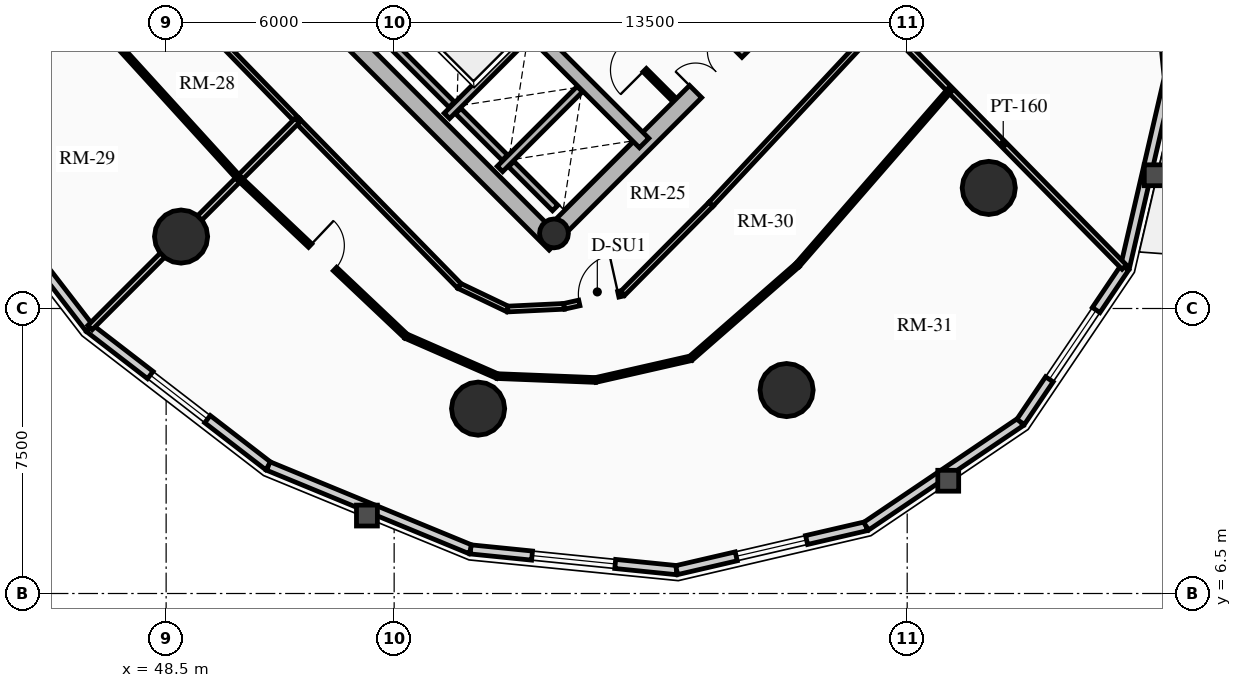
"""IFC4 building model, lengths in metres.
Left out: names, types, materials, properties, quantities, classifications, styles, units other than length and angle.
Written with IfcOpenShell. Run it as: python <this file> out.ifc"""

import sys

from ifc_helpers import new_model, si_unit, direction, frame, frame_2d, origin, origin_2d, place, context, subcontext, project, spatial, rectangle, circle, hollow_circle, extrude, source, transform, mapped, element, fill, save


model = new_model("IFC4")
c1 = context("Model", 3, precision=1e-05, world=origin(), true_north=direction((0.0, 1.0)))
c2 = subcontext(c1, "Body", "Model", "MODEL_VIEW")
j1 = project(units=[si_unit("LENGTHUNIT", "METRE"), si_unit("PLANEANGLEUNIT", "RADIAN")], contexts=[c1])
p1 = place(None, origin())
s1 = spatial("IfcSite", under=j1, at=p1, CompositionType="ELEMENT")
p2 = place(p1, origin())
s2 = spatial("IfcBuilding", under=s1, at=p2, CompositionType="ELEMENT")
p3 = place(p2, frame((0.0, 0.0, 87.61)))
s3 = spatial("IfcBuildingStorey", under=s2, at=p3, CompositionType="ELEMENT", Elevation=87.61)
p4 = place(p3, frame((58.737, 15.697, 0.0), z_axis=(0.0, 0.0, 1.0), x_axis=(-0.707106781187, 0.707106781187, 0.0)))
e1 = element("IfcWall", 1, at=p4, inside=s3, PredefinedType="SHEAR", context=c2, shape_type="SweptSolid", body=[
    extrude(rectangle(XDim=14.2, YDim=0.45, at=frame_2d((7.1, 0.0))), origin(), (0.0, 0.0, 1.0), 2.91),
])
p5 = place(p3, frame((58.578, 15.856, 0.0), z_axis=(0.0, 0.0, 1.0), x_axis=(0.707106781187, 0.707106781187, 0.0)))
e2 = element("IfcWall", 2, at=p5, inside=s3, PredefinedType="SHEAR", context=c2, shape_type="SweptSolid", body=[
    extrude(rectangle(XDim=10.7, YDim=0.45, at=frame_2d((5.35, 0.0))), origin(), (0.0, 0.0, 1.0), 2.91),
])
m1 = source(origin(), c2, "Body", "SweptSolid", [
    extrude(rectangle(XDim=1.5, YDim=2.02, at=frame_2d((0.75, 1.01))), frame((0.0, 0.235, 0.0), z_axis=(0.0, -1.0, 0.0), x_axis=(1.0, 0.0, 0.0)), (0.0, 0.0, 1.0), 0.47),
])
p6 = place(p5, frame((5.45, 0.0, 0.0)))
e3 = element("IfcOpeningElement", 3, at=p6, cuts=e2, PredefinedType="OPENING", context=c2, shape_type="MappedRepresentation", body=[
    mapped(m1, transform((0.0, 0.0, 0.0), x_axis=(1.0, 0.0, 0.0), y_axis=(0.0, 1.0, 0.0), z_axis=(0.0, 0.0, 1.0), scale=1.0)),
])
p7 = place(p3, frame((61.078, 18.355, 0.0), z_axis=(0.0, 0.0, 1.0), x_axis=(-0.707106781187, 0.707106781187, 0.0)))
e4 = element("IfcWall", 4, at=p7, inside=s3, PredefinedType="SHEAR", context=c2, shape_type="SweptSolid", body=[
    extrude(rectangle(XDim=13.75, YDim=0.35, at=frame_2d((6.875, 0.0))), origin(), (0.0, 0.0, 1.0), 2.91),
])
m2 = source(origin(), c2, "Body", "SweptSolid", [
    extrude(rectangle(XDim=1.1, YDim=2.015, at=frame_2d((0.55, 1.007))), frame((0.0, 0.185, 0.0), z_axis=(0.0, -1.0, 0.0), x_axis=(1.0, 0.0, 0.0)), (0.0, 0.0, 1.0), 0.37),
])
p8 = place(p7, frame((4.875, 0.0, 0.0)))
e5 = element("IfcOpeningElement", 5, at=p8, cuts=e4, PredefinedType="OPENING", context=c2, shape_type="MappedRepresentation", body=[
    mapped(m2, transform((0.0, 0.0, 0.0), x_axis=(1.0, 0.0, 0.0), y_axis=(0.0, 1.0, 0.0), z_axis=(0.0, 0.0, 1.0), scale=1.0)),
])
m3 = source(origin(), c2, "Body", "SweptSolid", [
    extrude(rectangle(XDim=1.15, YDim=2.02, at=frame_2d((0.575, 1.01))), frame((0.0, 0.185, 0.0), z_axis=(0.0, -1.0, 0.0), x_axis=(1.0, 0.0, 0.0)), (0.0, 0.0, 1.0), 0.37),
])
p9 = place(p7, frame((7.295, 0.0, 0.0)))
e6 = element("IfcOpeningElement", 6, at=p9, cuts=e4, PredefinedType="OPENING", context=c2, shape_type="MappedRepresentation", body=[
    mapped(m3, transform((0.0, 0.0, 0.0), x_axis=(1.0, 0.0, 0.0), y_axis=(0.0, 1.0, 0.0), z_axis=(0.0, 0.0, 1.0), scale=1.0)),
])
p10 = place(p3, frame((58.706, 15.976, 0.0), z_axis=(0.0, 0.0, 1.0), x_axis=(0.707106781187, 0.707106781187, 0.0)))
e7 = element("IfcColumn", 7, at=p10, inside=s3, PredefinedType="COLUMN", context=c2, shape_type="SweptSolid", body=[
    extrude(hollow_circle(Radius=0.38, WallThickness=0.032, at=origin_2d()), origin(), (0.0, 0.0, 1.0), 2.91),
])
for number, where, z_axis, x_axis in (
    (8, (48.893, 15.893, 0.0), (0.0, 0.0, 1.0), (1.0, 0.0, 0.0)),
    (9, (56.709, 11.365, 0.0), (0.0, 0.0, 1.0), (1.0, 0.0, 0.0)),
    (10, (64.827, 11.854, 0.0), (0.0, 0.0, 1.0), (1.0, 0.0, 0.0)),
    (11, (70.146, 17.173, 0.0), (0.0, 0.0, 1.0), (1.0, 0.0, 0.0)),
):
    element("IfcColumn", number, at=place(p3, frame(where, z_axis=z_axis, x_axis=x_axis)), inside=s3, PredefinedType="USERDEFINED", context=c2, shape_type="SweptSolid", body=[
        extrude(circle(Radius=0.7, at=origin_2d()), origin(), (0.0, 0.0, 1.0), 2.91),
    ])
p11 = place(p3, frame((46.483, 13.483, 0.0), z_axis=(0.0, 0.0, 1.0), x_axis=(-0.61054437102, 0.791982052206, 0.0)))
e12 = element("IfcWall", 12, at=p11, inside=s3, PredefinedType="SOLIDWALL", context=c2, shape_type="SweptSolid", body=[
    extrude(rectangle(XDim=5.942, YDim=0.24, at=frame_2d((2.971, 0.0))), origin(), (0.0, 0.0, 1.0), 2.179),
])
p12 = place(p3, frame((51.189, 9.855, 0.0), z_axis=(0.0, 0.0, 1.0), x_axis=(-0.791982052206, 0.61054437102, 0.0)))
e13 = element("IfcWall", 13, at=p12, inside=s3, PredefinedType="SOLIDWALL", context=c2, shape_type="SweptSolid", body=[
    extrude(rectangle(XDim=5.942, YDim=0.24, at=frame_2d((2.971, 0.0))), origin(), (0.0, 0.0, 1.0), 2.179),
])
m4 = source(origin(), c2, "Body", "SweptSolid", [
    extrude(rectangle(XDim=1.9, YDim=1.35, at=frame_2d((0.95, 0.675))), frame((0.0, 0.13, 0.0), z_axis=(0.0, -1.0, 0.0), x_axis=(1.0, 0.0, 0.0)), (0.0, 0.0, 1.0), 0.26),
])
p13 = place(p12, frame((2.021, 0.0, 0.65)))
e14 = element("IfcOpeningElement", 14, at=p13, cuts=e13, PredefinedType="OPENING", context=c2, shape_type="MappedRepresentation", body=[
    mapped(m4, transform((0.0, 0.0, 0.0), x_axis=(1.0, 0.0, 0.0), y_axis=(0.0, 1.0, 0.0), z_axis=(0.0, 0.0, 1.0), scale=1.0)),
])
p14 = place(p3, frame((56.513, 7.661, 0.0), z_axis=(0.0, 0.0, 1.0), x_axis=(-0.924563909604, 0.381027003055, 0.0)))
e15 = element("IfcWall", 15, at=p14, inside=s3, PredefinedType="SOLIDWALL", context=c2, shape_type="SweptSolid", body=[
    extrude(rectangle(XDim=5.758, YDim=0.24, at=frame_2d((2.879, 0.0))), origin(), (0.0, 0.0, 1.0), 2.179),
])
p15 = place(p3, frame((61.933, 7.115, 0.0), z_axis=(0.0, 0.0, 1.0), x_axis=(-0.994971754311, 0.10015591906, 0.0)))
e16 = element("IfcWall", 16, at=p15, inside=s3, PredefinedType="SOLIDWALL", context=c2, shape_type="SweptSolid", body=[
    extrude(rectangle(XDim=5.448, YDim=0.24, at=frame_2d((2.724, 0.0))), origin(), (0.0, 0.0, 1.0), 2.179),
])
m5 = source(origin(), c2, "Body", "SweptSolid", [
    extrude(rectangle(XDim=2.2, YDim=1.35, at=frame_2d((1.1, 0.675))), frame((0.0, 0.13, 0.0), z_axis=(0.0, -1.0, 0.0), x_axis=(1.0, 0.0, 0.0)), (0.0, 0.0, 1.0), 0.26),
])
p16 = place(p15, frame((1.624, 0.0, 0.65)))
e17 = element("IfcOpeningElement", 17, at=p16, cuts=e16, PredefinedType="OPENING", context=c2, shape_type="MappedRepresentation", body=[
    mapped(m5, transform((0.0, 0.0, 0.0), x_axis=(1.0, 0.0, 0.0), y_axis=(0.0, 1.0, 0.0), z_axis=(0.0, 0.0, 1.0), scale=1.0)),
])
p17 = place(p3, frame((66.92, 8.271, 0.0), z_axis=(0.0, 0.0, 1.0), x_axis=(-0.974165631126, -0.225834725257, 0.0)))
e18 = element("IfcWall", 18, at=p17, inside=s3, PredefinedType="SOLIDWALL", context=c2, shape_type="SweptSolid", body=[
    extrude(rectangle(XDim=5.119, YDim=0.24, at=frame_2d((2.56, 0.0))), origin(), (0.0, 0.0, 1.0), 2.179),
])
p18 = place(p17, frame((1.609, 0.0, 0.65)))
e19 = element("IfcOpeningElement", 19, at=p18, cuts=e18, PredefinedType="OPENING", context=c2, shape_type="MappedRepresentation", body=[
    mapped(m4, transform((0.0, 0.0, 0.0), x_axis=(1.0, 0.0, 0.0), y_axis=(0.0, 1.0, 0.0), z_axis=(0.0, 0.0, 1.0), scale=1.0)),
])
p19 = place(p3, frame((70.985, 11.015, 0.0), z_axis=(0.0, 0.0, 1.0), x_axis=(-0.828781148131, -0.559572880421, 0.0)))
e20 = element("IfcWall", 20, at=p19, inside=s3, PredefinedType="SOLIDWALL", context=c2, shape_type="SweptSolid", body=[
    extrude(rectangle(XDim=4.905, YDim=0.24, at=frame_2d((2.452, 0.0))), origin(), (0.0, 0.0, 1.0), 2.179),
])
p20 = place(p3, frame((73.729, 15.08, 0.0), z_axis=(0.0, 0.0, 1.0), x_axis=(-0.559572880421, -0.828781148131, 0.0)))
e21 = element("IfcWall", 21, at=p20, inside=s3, PredefinedType="SOLIDWALL", context=c2, shape_type="SweptSolid", body=[
    extrude(rectangle(XDim=4.905, YDim=0.24, at=frame_2d((2.452, 0.0))), origin(), (0.0, 0.0, 1.0), 2.179),
])
p21 = place(p20, frame((1.352, 0.0, 0.65)))
e22 = element("IfcOpeningElement", 22, at=p21, cuts=e21, PredefinedType="OPENING", context=c2, shape_type="MappedRepresentation", body=[
    mapped(m5, transform((0.0, 0.0, 0.0), x_axis=(1.0, 0.0, 0.0), y_axis=(0.0, 1.0, 0.0), z_axis=(0.0, 0.0, 1.0), scale=1.0)),
])
p22 = place(p3, frame((74.885, 20.067, 0.0), z_axis=(0.0, 0.0, 1.0), x_axis=(-0.225834725257, -0.974165631126, 0.0)))
e23 = element("IfcWall", 23, at=p22, inside=s3, PredefinedType="SOLIDWALL", context=c2, shape_type="SweptSolid", body=[
    extrude(rectangle(XDim=5.119, YDim=0.24, at=frame_2d((2.56, 0.0))), origin(), (0.0, 0.0, 1.0), 2.179),
])
p23 = place(p3, frame((74.339, 25.487, 0.0), z_axis=(0.0, 0.0, 1.0), x_axis=(0.10015591906, -0.994971754311, 0.0)))
e24 = element("IfcWall", 24, at=p23, inside=s3, PredefinedType="SOLIDWALL", context=c2, shape_type="SweptSolid", body=[
    extrude(rectangle(XDim=5.448, YDim=0.24, at=frame_2d((2.724, 0.0))), origin(), (0.0, 0.0, 1.0), 2.179),
])
p24 = place(p23, frame((1.774, 0.0, 0.65)))
e25 = element("IfcOpeningElement", 25, at=p24, cuts=e24, PredefinedType="OPENING", context=c2, shape_type="MappedRepresentation", body=[
    mapped(m4, transform((0.0, 0.0, 0.0), x_axis=(1.0, 0.0, 0.0), y_axis=(0.0, 1.0, 0.0), z_axis=(0.0, 0.0, 1.0), scale=1.0)),
])
p25 = place(p3, frame((55.888, 19.069, 0.0), z_axis=(0.0, 0.0, 1.0), x_axis=(0.707106781187, 0.707106781187, 0.0)))
e26 = element("IfcWall", 26, at=p25, inside=s3, PredefinedType="SHEAR", context=c2, shape_type="SweptSolid", body=[
    extrude(rectangle(XDim=2.97, YDim=0.2, at=frame_2d((1.485, 0.0))), origin(), (0.0, 0.0, 1.0), 2.91),
])
p26 = place(p3, frame((56.015, 19.366, 0.0), z_axis=(0.0, 0.0, 1.0), x_axis=(-0.707106781187, 0.707106781187, 0.0)))
e27 = element("IfcWall", 27, at=p26, inside=s3, PredefinedType="SHEAR", context=c2, shape_type="SweptSolid", body=[
    extrude(rectangle(XDim=2.44, YDim=0.2, at=frame_2d((1.22, 0.0))), origin(), (0.0, 0.0, 1.0), 2.91),
])
p27 = place(p3, frame((57.284, 17.673, 0.0), z_axis=(0.0, 0.0, 1.0), x_axis=(0.707147878904, 0.70706568108, 0.0)))
e28 = element("IfcWall", 28, at=p27, inside=s3, PredefinedType="SHEAR", context=c2, shape_type="SweptSolid", body=[
    extrude(rectangle(XDim=2.97, YDim=0.2, at=frame_2d((1.485, 0.0))), origin(), (0.0, 0.0, 1.0), 2.91),
])
p28 = place(p3, frame((57.412, 17.97, 0.0), z_axis=(0.0, 0.0, 1.0), x_axis=(-0.707106781187, 0.707106781187, 0.0)))
e29 = element("IfcWall", 29, at=p28, inside=s3, PredefinedType="SHEAR", context=c2, shape_type="SweptSolid", body=[
    extrude(rectangle(XDim=1.735, YDim=0.2, at=frame_2d((0.867, 0.0))), origin(), (0.0, 0.0, 1.0), 2.91),
])
p29 = place(p3, frame((58.737, 16.644, 0.0), z_axis=(0.0, 0.0, 1.0), x_axis=(-0.707032117043, 0.707181437447, 0.0)))
e30 = element("IfcWall", 30, at=p29, inside=s3, PredefinedType="SHEAR", context=c2, shape_type="SweptSolid", body=[
    extrude(rectangle(XDim=1.635, YDim=0.2, at=frame_2d((0.817, 0.0))), origin(), (0.0, 0.0, 1.0), 2.91),
])
p30 = place(p3, frame((61.835, 19.529, 0.0), z_axis=(0.0, 0.0, 1.0), x_axis=(-0.707146413884, 0.707067146267, 0.0)))
e31 = element("IfcWall", 31, at=p30, inside=s3, PredefinedType="PARTITIONING", context=c2, shape_type="SweptSolid", body=[
    extrude(rectangle(XDim=3.08, YDim=0.125, at=frame_2d((1.54, 0.0))), origin(), (0.0, 0.0, 1.0), 2.655),
])
m6 = source(origin(), c2, "Body", "SweptSolid", [
    extrude(rectangle(XDim=0.9, YDim=2.005, at=frame_2d((0.45, 1.002))), frame((0.0, 0.073, 0.0), z_axis=(0.0, -1.0, 0.0), x_axis=(1.0, 0.0, 0.0)), (0.0, 0.0, 1.0), 0.145),
])
p31 = place(p30, frame((1.05, 0.0, 0.0)))
e32 = element("IfcOpeningElement", 32, at=p31, cuts=e31, PredefinedType="OPENING", context=c2, shape_type="MappedRepresentation", body=[
    mapped(m6, transform((0.0, 0.0, 0.0), x_axis=(1.0, 0.0, 0.0), y_axis=(0.0, 1.0, 0.0), z_axis=(0.0, 0.0, 1.0), scale=1.0)),
])
p32 = place(p3, frame((47.786, 23.242, 0.0), z_axis=(0.0, 0.0, 1.0), x_axis=(0.696183456981, -0.717863910659, 0.0)))
e33 = element("IfcWall", 33, at=p32, inside=s3, PredefinedType="PARTITIONING", context=c2, shape_type="SweptSolid", body=[
    extrude(rectangle(XDim=5.979, YDim=0.15, at=frame_2d((2.99, 0.0))), origin(), (0.0, 0.0, 1.0), 2.655),
])
p33 = place(p3, frame((51.949, 18.949, 0.0), z_axis=(0.0, 0.0, 1.0), x_axis=(0.699801520154, -0.714337337951, 0.0)))
e34 = element("IfcWall", 34, at=p33, inside=s3, PredefinedType="PARTITIONING", context=c2, shape_type="SweptSolid", body=[
    extrude(rectangle(XDim=6.097, YDim=0.15, at=frame_2d((3.048, 0.0))), origin(), (0.0, 0.0, 1.0), 2.225),
])
p34 = place(p3, frame((56.216, 14.594, 0.0), z_axis=(0.0, 0.0, 1.0), x_axis=(0.902219207281, -0.431277755064, 0.0)))
e35 = element("IfcWall", 35, at=p34, inside=s3, PredefinedType="PARTITIONING", context=c2, shape_type="SweptSolid", body=[
    extrude(rectangle(XDim=1.41, YDim=0.15, at=frame_2d((0.705, 0.0))), origin(), (0.0, 0.0, 1.0), 2.225),
])
p35 = place(p3, frame((57.488, 13.986, 0.0), z_axis=(0.0, 0.0, 1.0), x_axis=(0.998863298217, 0.047666670476, 0.0)))
e36 = element("IfcWall", 36, at=p35, inside=s3, PredefinedType="PARTITIONING", context=c2, shape_type="SweptSolid", body=[
    extrude(rectangle(XDim=1.485, YDim=0.15, at=frame_2d((0.743, 0.0))), origin(), (0.0, 0.0, 1.0), 2.225),
])
p36 = place(p3, frame((58.971, 14.057, 0.0), z_axis=(0.0, 0.0, 1.0), x_axis=(0.976085233804, 0.217388169756, 0.0)))
e37 = element("IfcWall", 37, at=p36, inside=s3, PredefinedType="PARTITIONING", context=c2, shape_type="SweptSolid", body=[
    extrude(rectangle(XDim=1.581, YDim=0.15, at=frame_2d((0.791, 0.0))), origin(), (0.0, 0.0, 1.0), 2.225),
])
m7 = source(origin(), c2, "Body", "SweptSolid", [
    extrude(rectangle(XDim=1.05, YDim=2.015, at=frame_2d((0.525, 1.007))), frame((0.0, 0.085, 0.0), z_axis=(0.0, -1.0, 0.0), x_axis=(1.0, 0.0, 0.0)), (0.0, 0.0, 1.0), 0.17),
])
p37 = place(p36, frame((0.411, 0.0, 0.0)))
e38 = element("IfcOpeningElement", 38, at=p37, cuts=e37, PredefinedType="OPENING", context=c2, shape_type="MappedRepresentation", body=[
    mapped(m7, transform((0.0, 0.0, 0.0), x_axis=(1.0, 0.0, 0.0), y_axis=(0.0, 1.0, 0.0), z_axis=(0.0, 0.0, 1.0), scale=1.0)),
])
p38 = place(p3, frame((60.515, 14.401, 0.0), z_axis=(0.0, 0.0, 1.0), x_axis=(0.704179607439, 0.710021887316, 0.0)))
e39 = element("IfcWall", 39, at=p38, inside=s3, PredefinedType="PARTITIONING", context=c2, shape_type="SweptSolid", body=[
    extrude(rectangle(XDim=3.301, YDim=0.15, at=frame_2d((1.651, 0.0))), origin(), (0.0, 0.0, 1.0), 2.225),
])
p39 = place(p3, frame((62.839, 16.745, 0.0), z_axis=(0.0, 0.0, 1.0), x_axis=(0.682386779427, 0.73099130177, 0.0)))
e40 = element("IfcWall", 40, at=p39, inside=s3, PredefinedType="PARTITIONING", context=c2, shape_type="SweptSolid", body=[
    extrude(rectangle(XDim=6.6, YDim=0.15, at=frame_2d((3.3, 0.0))), origin(), (0.0, 0.0, 1.0), 2.225),
])
p40 = place(p3, frame((51.949, 18.949, 0.0), z_axis=(0.0, 0.0, 1.0), x_axis=(-0.707106781187, -0.707106781187, 0.0)))
e41 = element("IfcWall", 41, at=p40, inside=s3, PredefinedType="PARTITIONING", context=c2, shape_type="SweptSolid", body=[
    extrude(rectangle(XDim=7.711, YDim=0.16, at=frame_2d((3.855, 0.0))), origin(), (0.0, 0.0, 1.0), 2.179),
])
p41 = place(p3, frame((67.343, 21.569, 0.0), z_axis=(0.0, 0.0, 1.0), x_axis=(0.700899237588, -0.713260302238, 0.0)))
e42 = element("IfcWall", 42, at=p41, inside=s3, PredefinedType="PARTITIONING", context=c2, shape_type="SweptSolid", body=[
    extrude(rectangle(XDim=9.085, YDim=0.16, at=frame_2d((4.543, 0.0))), origin(), (0.0, 0.0, 1.0), 2.179),
])
p42 = place(p3, frame((46.41, 21.83, 0.0), z_axis=(0.0, 0.0, 1.0), x_axis=(0.6732109009, -0.739450527696, 0.0)))
e43 = element("IfcWall", 43, at=p42, inside=s3, PredefinedType="PARTITIONING", context=c2, shape_type="SweptSolid", body=[
    extrude(rectangle(XDim=5.96, YDim=0.125, at=frame_2d((2.98, 0.0))), origin(), (0.0, 0.0, 1.0), 2.655),
])
p43 = place(p3, frame((50.423, 17.423, 0.0), z_axis=(0.0, 0.0, 1.0), x_axis=(0.726497320663, -0.68716929724, 0.0)))
e44 = element("IfcWall", 44, at=p43, inside=s3, PredefinedType="PARTITIONING", context=c2, shape_type="SweptSolid", body=[
    extrude(rectangle(XDim=6.04, YDim=0.125, at=frame_2d((3.02, 0.0))), origin(), (0.0, 0.0, 1.0), 2.225),
])
p44 = place(p43, frame((2.57, 0.0, 0.0)))
e45 = element("IfcOpeningElement", 45, at=p44, cuts=e44, PredefinedType="OPENING", context=c2, shape_type="MappedRepresentation", body=[
    mapped(m6, transform((0.0, 0.0, 0.0), x_axis=(1.0, 0.0, 0.0), y_axis=(0.0, 1.0, 0.0), z_axis=(0.0, 0.0, 1.0), scale=1.0)),
])
p45 = place(p3, frame((54.811, 13.272, 0.0), z_axis=(0.0, 0.0, 1.0), x_axis=(0.91625765715, -0.400589447831, 0.0)))
e46 = element("IfcWall", 46, at=p45, inside=s3, PredefinedType="PARTITIONING", context=c2, shape_type="SweptSolid", body=[
    extrude(rectangle(XDim=2.624, YDim=0.125, at=frame_2d((1.312, 0.0))), origin(), (0.0, 0.0, 1.0), 2.225),
])
p46 = place(p3, frame((57.215, 12.221, 0.0), z_axis=(0.0, 0.0, 1.0), x_axis=(0.999225050732, -0.039361122818, 0.0)))
e47 = element("IfcWall", 47, at=p46, inside=s3, PredefinedType="PARTITIONING", context=c2, shape_type="SweptSolid", body=[
    extrude(rectangle(XDim=2.586, YDim=0.125, at=frame_2d((1.293, 0.0))), origin(), (0.0, 0.0, 1.0), 2.655),
])
p47 = place(p3, frame((59.8, 12.119, 0.0), z_axis=(0.0, 0.0, 1.0), x_axis=(0.975045061532, 0.222007044895, 0.0)))
e48 = element("IfcWall", 48, at=p47, inside=s3, PredefinedType="PARTITIONING", context=c2, shape_type="SweptSolid", body=[
    extrude(rectangle(XDim=2.57, YDim=0.125, at=frame_2d((1.285, 0.0))), origin(), (0.0, 0.0, 1.0), 2.225),
])
p48 = place(p3, frame((62.306, 12.689, 0.0), z_axis=(0.0, 0.0, 1.0), x_axis=(0.753127589311, 0.657874482115, 0.0)))
e49 = element("IfcWall", 49, at=p48, inside=s3, PredefinedType="PARTITIONING", context=c2, shape_type="SweptSolid", body=[
    extrude(rectangle(XDim=3.732, YDim=0.125, at=frame_2d((1.866, 0.0))), origin(), (0.0, 0.0, 1.0), 2.225),
])
p49 = place(p3, frame((65.116, 15.145, 0.0), z_axis=(0.0, 0.0, 1.0), x_axis=(0.656272685344, 0.75452379848, 0.0)))
e50 = element("IfcWall", 50, at=p49, inside=s3, PredefinedType="PARTITIONING", context=c2, shape_type="SweptSolid", body=[
    extrude(rectangle(XDim=6.11, YDim=0.125, at=frame_2d((3.055, 0.0))), origin(), (0.0, 0.0, 1.0), 2.225),
])
m8 = source(origin(), c2, "Body", "SweptSolid", [
    extrude(rectangle(XDim=1.9, YDim=1.35, at=frame_2d((0.95, 0.675))), frame((0.0, 0.03, 0.0), z_axis=(0.0, -1.0, 0.0), x_axis=(1.0, 0.0, 0.0)), (0.0, 0.0, 1.0), 0.06),
])
p50 = place(p13, origin())
e51 = element("IfcWindow", 51, at=p50, inside=s3, PartitioningType="DOUBLE_PANEL_VERTICAL", PredefinedType="WINDOW", context=c2, shape_type="MappedRepresentation", body=[
    mapped(m8, transform((0.0, 0.0, 0.0), x_axis=(1.0, 0.0, 0.0), y_axis=(0.0, 1.0, 0.0), z_axis=(0.0, 0.0, 1.0), scale=1.0)),
])
fill(e14, e51)
m9 = source(origin(), c2, "Body", "SweptSolid", [
    extrude(rectangle(XDim=2.2, YDim=1.35, at=frame_2d((1.1, 0.675))), frame((0.0, 0.03, 0.0), z_axis=(0.0, -1.0, 0.0), x_axis=(1.0, 0.0, 0.0)), (0.0, 0.0, 1.0), 0.06),
])
p51 = place(p16, origin())
e52 = element("IfcWindow", 52, at=p51, inside=s3, PartitioningType="DOUBLE_PANEL_VERTICAL", PredefinedType="WINDOW", context=c2, shape_type="MappedRepresentation", body=[
    mapped(m9, transform((0.0, 0.0, 0.0), x_axis=(1.0, 0.0, 0.0), y_axis=(0.0, 1.0, 0.0), z_axis=(0.0, 0.0, 1.0), scale=1.0)),
])
fill(e17, e52)
p52 = place(p18, origin())
e53 = element("IfcWindow", 53, at=p52, inside=s3, PartitioningType="DOUBLE_PANEL_VERTICAL", PredefinedType="WINDOW", context=c2, shape_type="MappedRepresentation", body=[
    mapped(m8, transform((0.0, 0.0, 0.0), x_axis=(1.0, 0.0, 0.0), y_axis=(0.0, 1.0, 0.0), z_axis=(0.0, 0.0, 1.0), scale=1.0)),
])
fill(e19, e53)
p53 = place(p21, origin())
e54 = element("IfcWindow", 54, at=p53, inside=s3, PartitioningType="DOUBLE_PANEL_VERTICAL", PredefinedType="WINDOW", context=c2, shape_type="MappedRepresentation", body=[
    mapped(m9, transform((0.0, 0.0, 0.0), x_axis=(1.0, 0.0, 0.0), y_axis=(0.0, 1.0, 0.0), z_axis=(0.0, 0.0, 1.0), scale=1.0)),
])
fill(e22, e54)
m10 = source(origin(), c2, "Body", "SweptSolid", [
    extrude(rectangle(XDim=1.5, YDim=2.02, at=frame_2d((0.75, 1.01))), frame((0.0, 0.025, 0.0), z_axis=(0.0, -1.0, 0.0), x_axis=(1.0, 0.0, 0.0)), (0.0, 0.0, 1.0), 0.05),
])
p54 = place(p6, origin())
e55 = element("IfcDoor", 55, at=p54, inside=s3, OperationType="DOUBLE_DOOR_SINGLE_SWING", PredefinedType="DOOR", context=c2, shape_type="MappedRepresentation", body=[
    mapped(m10, transform((0.0, 0.0, 0.0), x_axis=(1.0, 0.0, 0.0), y_axis=(0.0, 1.0, 0.0), z_axis=(0.0, 0.0, 1.0), scale=1.0)),
])
fill(e3, e55)
m11 = source(origin(), c2, "Body", "SweptSolid", [
    extrude(rectangle(XDim=0.9, YDim=2.005, at=frame_2d((0.45, 1.002))), frame((0.0, 0.025, 0.0), z_axis=(0.0, -1.0, 0.0), x_axis=(1.0, 0.0, 0.0)), (0.0, 0.0, 1.0), 0.05),
])
p55 = place(p31, origin())
e56 = element("IfcDoor", 56, at=p55, inside=s3, OperationType="SINGLE_SWING_LEFT", PredefinedType="DOOR", context=c2, shape_type="MappedRepresentation", body=[
    mapped(m11, transform((0.0, 0.0, 0.0), x_axis=(1.0, 0.0, 0.0), y_axis=(0.0, 1.0, 0.0), z_axis=(0.0, 0.0, 1.0), scale=1.0)),
])
fill(e32, e56)
m12 = source(origin(), c2, "Body", "SweptSolid", [
    extrude(rectangle(XDim=1.05, YDim=2.015, at=frame_2d((0.525, 1.007))), frame((0.0, 0.025, 0.0), z_axis=(0.0, -1.0, 0.0), x_axis=(1.0, 0.0, 0.0)), (0.0, 0.0, 1.0), 0.05),
])
p56 = place(p37, origin())
e57 = element("IfcDoor", 57, at=p56, inside=s3, OperationType="SINGLE_SWING_RIGHT", PredefinedType="DOOR", context=c2, shape_type="MappedRepresentation", body=[
    mapped(m12, transform((0.0, 0.0, 0.0), x_axis=(1.0, 0.0, 0.0), y_axis=(0.0, 1.0, 0.0), z_axis=(0.0, 0.0, 1.0), scale=1.0)),
])
fill(e38, e57)
p57 = place(p44, origin())
e58 = element("IfcDoor", 58, at=p57, inside=s3, OperationType="SINGLE_SWING_LEFT", PredefinedType="DOOR", context=c2, shape_type="MappedRepresentation", body=[
    mapped(m11, transform((0.0, 0.0, 0.0), x_axis=(1.0, 0.0, 0.0), y_axis=(0.0, 1.0, 0.0), z_axis=(0.0, 0.0, 1.0), scale=1.0)),
])
fill(e45, e58)
save(model, sys.argv[1])
